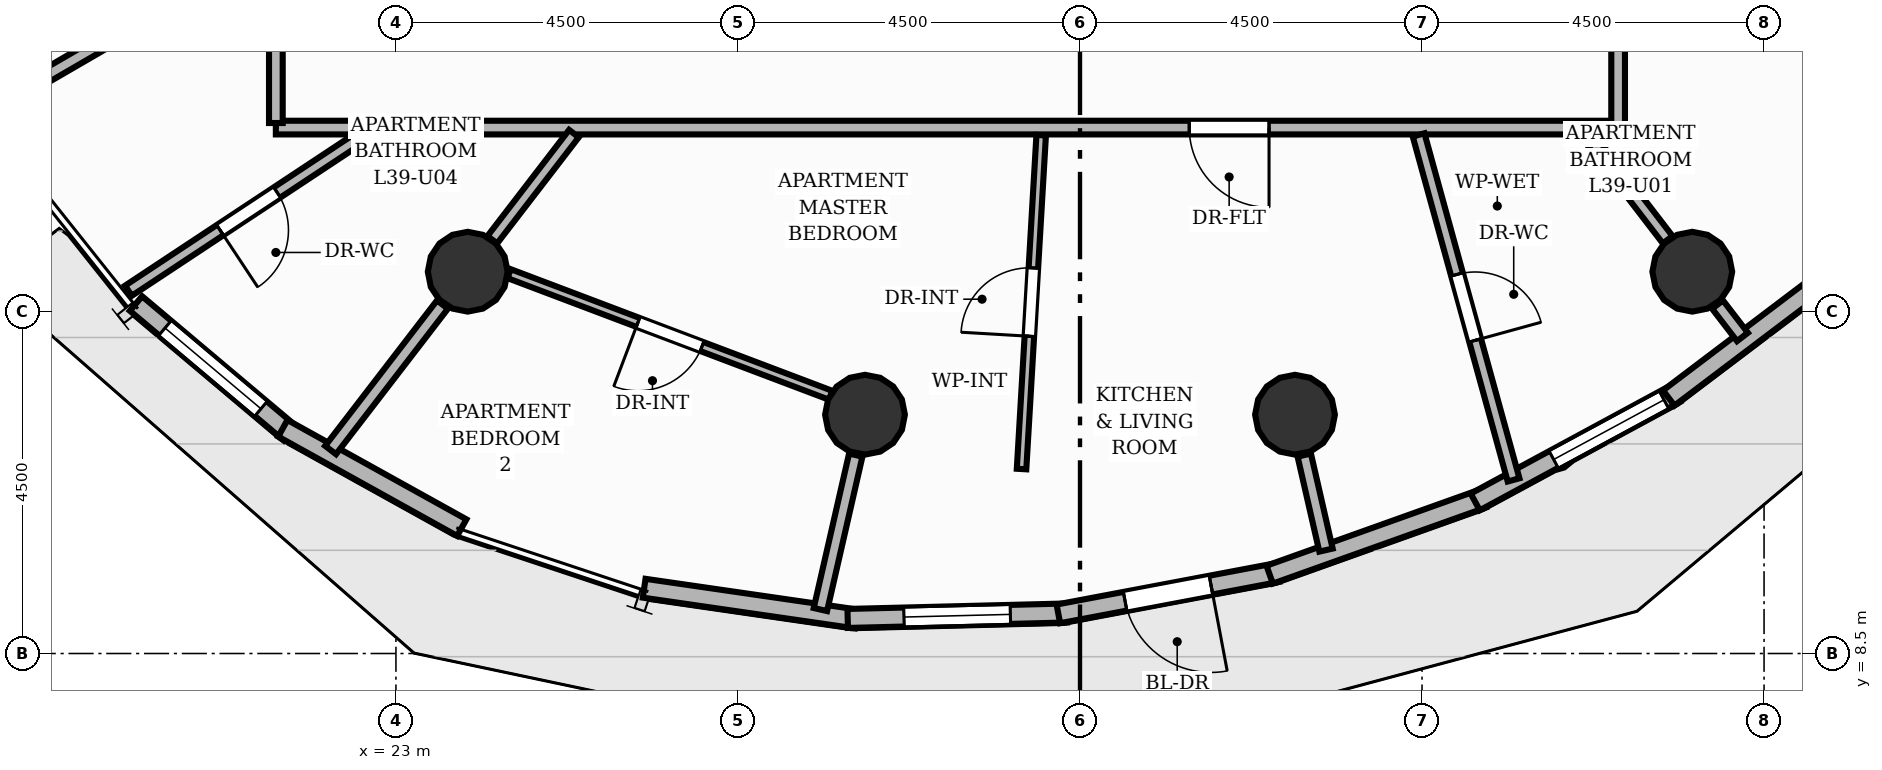
"""IFC4 building model, lengths in metres.
Left out: names, types, materials, properties, quantities, classifications, styles, units other than length and angle.
Written with IfcOpenShell. Run it as: python <this file> out.ifc"""

import sys

from ifc_helpers import new_model, si_unit, direction, frame, frame_2d, origin, origin_2d, place, context, subcontext, project, spatial, rectangle, circle, extrude, element, fill, save


model = new_model("IFC4")
c1 = context("Model", 3, precision=1e-05, world=origin(), true_north=direction((0.0, 1.0)))
c2 = subcontext(c1, "Body", "Model", "MODEL_VIEW")
j1 = project(units=[si_unit("LENGTHUNIT", "METRE"), si_unit("PLANEANGLEUNIT", "RADIAN")], contexts=[c1])
p1 = place(None, origin())
s1 = spatial("IfcSite", under=j1, at=p1, CompositionType="ELEMENT")
p2 = place(p1, origin())
s2 = spatial("IfcBuilding", under=s1, at=p2, CompositionType="ELEMENT")
p3 = place(p2, frame((0.0, 0.0, 132.96)))
s3 = spatial("IfcBuildingStorey", under=s2, at=p3, CompositionType="ELEMENT", Elevation=132.96)
for number, where, z_axis, x_axis in (
    (1, (23.944, 13.523, 0.0), (0.0, 0.0, 1.0), (1.0, 0.0, 0.0)),
    (2, (29.171, 11.642, 0.0), (0.0, 0.0, 1.0), (1.0, 0.0, 0.0)),
    (3, (34.829, 11.642, 0.0), (0.0, 0.0, 1.0), (1.0, 0.0, 0.0)),
    (4, (40.056, 13.523, 0.0), (0.0, 0.0, 1.0), (1.0, 0.0, 0.0)),
):
    element("IfcColumn", number, at=place(p3, frame(where, z_axis=z_axis, x_axis=x_axis)), inside=s3, PredefinedType="COLUMN", context=c2, shape_type="SweptSolid", body=[
        extrude(circle(Radius=0.525, at=origin_2d()), origin(), (0.0, 0.0, 1.0), 3.2),
    ])
p4 = place(p3, frame((21.605, 11.399, 0.0), z_axis=(0.0, 0.0, 1.0), x_axis=(-0.764825125467, 0.644237943197, 0.0)))
e5 = element("IfcWall", 5, at=p4, inside=s3, PredefinedType="SOLIDWALL", context=c2, shape_type="SweptSolid", body=[
    extrude(rectangle(XDim=2.648, YDim=0.25, at=frame_2d((1.324, 0.0))), origin(), (0.0, 0.0, 1.0), 2.96),
])
p5 = place(p4, frame((0.499, 0.0, 0.85)))
e6 = element("IfcOpeningElement", 6, at=p5, cuts=e5, PredefinedType="OPENING", context=c2, shape_type="SweptSolid", body=[
    extrude(rectangle(XDim=1.65, YDim=1.55, at=frame_2d((0.825, 0.775))), frame((0.0, 0.135, 0.0), z_axis=(0.0, -1.0, 0.0), x_axis=(1.0, 0.0, 0.0)), (0.0, 0.0, 1.0), 0.27),
])
p6 = place(p3, frame((23.866, 10.156, 0.0), z_axis=(0.0, 0.0, 1.0), x_axis=(-0.874341102682, 0.485311895755, 0.0)))
e7 = element("IfcWall", 7, at=p6, inside=s3, PredefinedType="SOLIDWALL", context=c2, shape_type="SweptSolid", body=[
    extrude(rectangle(XDim=2.693, YDim=0.25, at=frame_2d((1.346, 0.0))), origin(), (0.0, 0.0, 1.0), 2.96),
])
p7 = place(p3, frame((29.054, 8.955, 0.0), z_axis=(0.0, 0.0, 1.0), x_axis=(-0.98966505468, 0.143398324768, 0.0)))
e8 = element("IfcWall", 8, at=p7, inside=s3, PredefinedType="SOLIDWALL", context=c2, shape_type="SweptSolid", body=[
    extrude(rectangle(XDim=2.818, YDim=0.25, at=frame_2d((1.409, 0.0))), origin(), (0.0, 0.0, 1.0), 2.96),
])
p8 = place(p3, frame((31.824, 9.033, 0.0), z_axis=(0.0, 0.0, 1.0), x_axis=(-0.999687646408, -0.02499219116, 0.0)))
e9 = element("IfcWall", 9, at=p8, inside=s3, PredefinedType="SOLIDWALL", context=c2, shape_type="SweptSolid", body=[
    extrude(rectangle(XDim=2.882, YDim=0.25, at=frame_2d((1.441, 0.0))), origin(), (0.0, 0.0, 1.0), 2.96),
])
p9 = place(p8, frame((0.741, 0.0, 0.85)))
e10 = element("IfcOpeningElement", 10, at=p9, cuts=e9, PredefinedType="OPENING", context=c2, shape_type="SweptSolid", body=[
    extrude(rectangle(XDim=1.4, YDim=1.55, at=frame_2d((0.7, 0.775))), frame((0.0, 0.135, 0.0), z_axis=(0.0, -1.0, 0.0), x_axis=(1.0, 0.0, 0.0)), (0.0, 0.0, 1.0), 0.27),
])
p10 = place(p3, frame((34.601, 9.566, 0.0), z_axis=(0.0, 0.0, 1.0), x_axis=(-0.982637070109, -0.185538105108, 0.0)))
e11 = element("IfcWall", 11, at=p10, inside=s3, PredefinedType="SOLIDWALL", context=c2, shape_type="SweptSolid", body=[
    extrude(rectangle(XDim=2.937, YDim=0.25, at=frame_2d((1.469, 0.0))), origin(), (0.0, 0.0, 1.0), 2.96),
])
p11 = place(p10, frame((0.893, 0.0, 0.0)))
e12 = element("IfcOpeningElement", 12, at=p11, cuts=e11, PredefinedType="OPENING", context=c2, shape_type="SweptSolid", body=[
    extrude(rectangle(XDim=1.15, YDim=2.2, at=frame_2d((0.575, 1.1))), frame((0.0, 0.135, 0.0), z_axis=(0.0, -1.0, 0.0), x_axis=(1.0, 0.0, 0.0)), (0.0, 0.0, 1.0), 0.27),
])
p12 = place(p3, frame((37.299, 10.539, 0.0), z_axis=(0.0, 0.0, 1.0), x_axis=(-0.94175304307, -0.33630522724, 0.0)))
e13 = element("IfcWall", 13, at=p12, inside=s3, PredefinedType="SOLIDWALL", context=c2, shape_type="SweptSolid", body=[
    extrude(rectangle(XDim=2.977, YDim=0.25, at=frame_2d((1.489, 0.0))), origin(), (0.0, 0.0, 1.0), 2.96),
])
p13 = place(p3, frame((39.837, 11.921, 0.0), z_axis=(0.0, 0.0, 1.0), x_axis=(-0.879567466611, -0.475774181393, 0.0)))
e14 = element("IfcWall", 14, at=p13, inside=s3, PredefinedType="SOLIDWALL", context=c2, shape_type="SweptSolid", body=[
    extrude(rectangle(XDim=2.998, YDim=0.25, at=frame_2d((1.499, 0.0))), origin(), (0.0, 0.0, 1.0), 2.96),
])
p14 = place(p13, frame((0.175, 0.0, 0.85)))
e15 = element("IfcOpeningElement", 15, at=p14, cuts=e14, PredefinedType="OPENING", context=c2, shape_type="SweptSolid", body=[
    extrude(rectangle(XDim=1.65, YDim=1.55, at=frame_2d((0.825, 0.775))), frame((0.0, 0.135, 0.0), z_axis=(0.0, -1.0, 0.0), x_axis=(1.0, 0.0, 0.0)), (0.0, 0.0, 1.0), 0.27),
])
p15 = place(p3, frame((42.137, 13.671, 0.0), z_axis=(0.0, 0.0, 1.0), x_axis=(-0.797511213298, -0.603304122863, 0.0)))
e16 = element("IfcWall", 16, at=p15, inside=s3, PredefinedType="SOLIDWALL", context=c2, shape_type="SweptSolid", body=[
    extrude(rectangle(XDim=2.998, YDim=0.25, at=frame_2d((1.499, 0.0))), origin(), (0.0, 0.0, 1.0), 2.96),
])
p16 = place(p3, frame((19.472, 16.726, 0.0), z_axis=(0.0, 0.0, 1.0), x_axis=(-0.864844369658, -0.502040054448, 0.0)))
e17 = element("IfcWall", 17, at=p16, inside=s3, PredefinedType="PARTITIONING", context=c2, shape_type="SweptSolid", body=[
    extrude(rectangle(XDim=1.974, YDim=0.18, at=frame_2d((0.987, 0.0))), origin(), (0.0, 0.0, 1.0), 2.336),
])
p17 = place(p3, frame((23.612, 13.092, 0.0), z_axis=(0.0, 0.0, 1.0), x_axis=(-0.609549509747, -0.79274800231, 0.0)))
e18 = element("IfcWall", 18, at=p17, inside=s3, PredefinedType="PARTITIONING", context=c2, shape_type="SweptSolid", body=[
    extrude(rectangle(XDim=2.415, YDim=0.18, at=frame_2d((1.208, 0.0))), origin(), (0.0, 0.0, 1.0), 2.336),
])
p18 = place(p3, frame((29.05, 11.111, 0.0), z_axis=(0.0, 0.0, 1.0), x_axis=(-0.223063251486, -0.974803973031, 0.0)))
e19 = element("IfcWall", 19, at=p18, inside=s3, PredefinedType="PARTITIONING", context=c2, shape_type="SweptSolid", body=[
    extrude(rectangle(XDim=2.085, YDim=0.18, at=frame_2d((1.042, 0.0))), origin(), (0.0, 0.0, 1.0), 2.336),
])
p19 = place(p3, frame((34.95, 11.111, 0.0), z_axis=(0.0, 0.0, 1.0), x_axis=(0.223093561241, -0.974797036789, 0.0)))
e20 = element("IfcWall", 20, at=p19, inside=s3, PredefinedType="PARTITIONING", context=c2, shape_type="SweptSolid", body=[
    extrude(rectangle(XDim=1.282, YDim=0.18, at=frame_2d((0.641, 0.0))), origin(), (0.0, 0.0, 1.0), 2.336),
])
p20 = place(p3, frame((40.388, 13.092, 0.0), z_axis=(0.0, 0.0, 1.0), x_axis=(0.609469486836, -0.792809526063, 0.0)))
e21 = element("IfcWall", 21, at=p20, inside=s3, PredefinedType="PARTITIONING", context=c2, shape_type="SweptSolid", body=[
    extrude(rectangle(XDim=0.538, YDim=0.18, at=frame_2d((0.269, 0.0))), origin(), (0.0, 0.0, 1.0), 2.336),
])
p21 = place(p3, frame((39.08, 15.42, 0.0), z_axis=(0.0, 0.0, 1.0), x_axis=(-1.0, 0.0, 0.0)))
e22 = element("IfcWall", 22, at=p21, inside=s3, PredefinedType="PARTITIONING", context=c2, shape_type="SweptSolid", body=[
    extrude(rectangle(XDim=16.39, YDim=0.18, at=frame_2d((8.195, 0.0))), origin(), (0.0, 0.0, 1.0), 2.955),
])
p22 = place(p21, frame((4.593, 0.0, 0.0)))
e23 = element("IfcOpeningElement", 23, at=p22, cuts=e22, PredefinedType="OPENING", context=c2, shape_type="SweptSolid", body=[
    extrude(rectangle(XDim=1.05, YDim=2.15, at=frame_2d((0.525, 1.075))), frame((0.0, 0.1, 0.0), z_axis=(0.0, -1.0, 0.0), x_axis=(1.0, 0.0, 0.0)), (0.0, 0.0, 1.0), 0.2),
])
p23 = place(p3, frame((39.08, 32.58, 0.0), z_axis=(0.0, 0.0, 1.0), x_axis=(0.0, -1.0, 0.0)))
e24 = element("IfcWall", 24, at=p23, inside=s3, PredefinedType="PARTITIONING", context=c2, shape_type="SweptSolid", body=[
    extrude(rectangle(XDim=17.16, YDim=0.18, at=frame_2d((8.58, 0.0))), origin(), (0.0, 0.0, 1.0), 2.955),
])
p24 = place(p23, frame((9.64, 0.0, 0.0)))
e25 = element("IfcOpeningElement", 25, at=p24, cuts=e24, PredefinedType="OPENING", context=c2, shape_type="SweptSolid", body=[
    extrude(rectangle(XDim=1.05, YDim=2.15, at=frame_2d((0.525, 1.075))), frame((0.0, 0.1, 0.0), z_axis=(0.0, -1.0, 0.0), x_axis=(1.0, 0.0, 0.0)), (0.0, 0.0, 1.0), 0.2),
])
p25 = place(p3, frame((22.746, 15.42, 0.0), z_axis=(0.0, 0.0, 1.0), x_axis=(-1.0, 0.0, 0.0)))
e26 = element("IfcWall", 26, at=p25, inside=s3, PredefinedType="PARTITIONING", context=c2, shape_type="SweptSolid", body=[
    extrude(rectangle(XDim=1.326, YDim=0.18, at=frame_2d((0.663, 0.0))), origin(), (0.0, 0.0, 1.0), 2.955),
])
p26 = place(p3, frame((21.42, 15.48, 0.0), z_axis=(0.0, 0.0, 1.0), x_axis=(0.0, 1.0, 0.0)))
e27 = element("IfcWall", 27, at=p26, inside=s3, PredefinedType="PARTITIONING", context=c2, shape_type="SweptSolid", body=[
    extrude(rectangle(XDim=6.12, YDim=0.18, at=frame_2d((3.06, 0.0))), origin(), (0.0, 0.0, 1.0), 2.955),
])
p27 = place(p26, frame((2.167, 0.0, 0.0)))
e28 = element("IfcOpeningElement", 28, at=p27, cuts=e27, PredefinedType="OPENING", context=c2, shape_type="SweptSolid", body=[
    extrude(rectangle(XDim=1.05, YDim=2.15, at=frame_2d((0.525, 1.075))), frame((0.0, 0.1, 0.0), z_axis=(0.0, -1.0, 0.0), x_axis=(1.0, 0.0, 0.0)), (0.0, 0.0, 1.0), 0.2),
])
p28 = place(p3, frame((36.455, 15.323, 0.0), z_axis=(0.0, 0.0, 1.0), x_axis=(0.265393905211, -0.964140070258, 0.0)))
e29 = element("IfcWall", 29, at=p28, inside=s3, PredefinedType="PLUMBINGWALL", context=c2, shape_type="SweptSolid", body=[
    extrude(rectangle(XDim=4.708, YDim=0.16, at=frame_2d((2.354, 0.0))), origin(), (0.0, 0.0, 1.0), 2.955),
])
p29 = place(p28, frame((1.904, 0.0, 0.0)))
e30 = element("IfcOpeningElement", 30, at=p29, cuts=e29, PredefinedType="OPENING", context=c2, shape_type="SweptSolid", body=[
    extrude(rectangle(XDim=0.9, YDim=2.1, at=frame_2d((0.45, 1.05))), frame((0.0, 0.09, 0.0), z_axis=(0.0, -1.0, 0.0), x_axis=(1.0, 0.0, 0.0)), (0.0, 0.0, 1.0), 0.18),
])
p30 = place(p3, frame((31.231, 10.927, 0.0), z_axis=(0.0, 0.0, 1.0), x_axis=(0.058751291398, 0.998272651012, 0.0)))
e31 = element("IfcWall", 31, at=p30, inside=s3, PredefinedType="PARTITIONING", context=c2, shape_type="SweptSolid", body=[
    extrude(rectangle(XDim=4.401, YDim=0.125, at=frame_2d((2.2, 0.0))), origin(), (0.0, 0.0, 1.0), 2.692),
])
p31 = place(p30, frame((1.75, 0.0, 0.0)))
e32 = element("IfcOpeningElement", 32, at=p31, cuts=e31, PredefinedType="OPENING", context=c2, shape_type="SweptSolid", body=[
    extrude(rectangle(XDim=0.9, YDim=2.1, at=frame_2d((0.45, 1.05))), frame((0.0, 0.073, 0.0), z_axis=(0.0, -1.0, 0.0), x_axis=(1.0, 0.0, 0.0)), (0.0, 0.0, 1.0), 0.145),
])
p32 = place(p3, frame((38.658, 15.341, 0.0), z_axis=(0.0, 0.0, 1.0), x_axis=(0.609536601946, -0.792757927042, 0.0)))
e33 = element("IfcWall", 33, at=p32, inside=s3, PredefinedType="PLUMBINGWALL", context=c2, shape_type="SweptSolid", body=[
    extrude(rectangle(XDim=1.761, YDim=0.16, at=frame_2d((0.881, 0.0))), origin(), (0.0, 0.0, 1.0), 2.336),
])
p33 = place(p3, frame((28.722, 11.897, 0.0), z_axis=(0.0, 0.0, 1.0), x_axis=(-0.935309901838, 0.353829602385, 0.0)))
e34 = element("IfcWall", 34, at=p33, inside=s3, PredefinedType="PARTITIONING", context=c2, shape_type="SweptSolid", body=[
    extrude(rectangle(XDim=4.526, YDim=0.125, at=frame_2d((2.263, 0.0))), origin(), (0.0, 0.0, 1.0), 2.411),
])
p34 = place(p33, frame((1.813, 0.0, 0.0)))
e35 = element("IfcOpeningElement", 35, at=p34, cuts=e34, PredefinedType="OPENING", context=c2, shape_type="SweptSolid", body=[
    extrude(rectangle(XDim=0.9, YDim=2.1, at=frame_2d((0.45, 1.05))), frame((0.0, 0.073, 0.0), z_axis=(0.0, -1.0, 0.0), x_axis=(1.0, 0.0, 0.0)), (0.0, 0.0, 1.0), 0.145),
])
p35 = place(p3, frame((24.268, 13.944, 0.0), z_axis=(0.0, 0.0, 1.0), x_axis=(0.609536601946, 0.792757927042, 0.0)))
e36 = element("IfcWall", 36, at=p35, inside=s3, PredefinedType="PLUMBINGWALL", context=c2, shape_type="SweptSolid", body=[
    extrude(rectangle(XDim=1.761, YDim=0.16, at=frame_2d((0.881, 0.0))), origin(), (0.0, 0.0, 1.0), 2.336),
])
p36 = place(p3, frame((22.643, 15.365, 0.0), z_axis=(0.0, 0.0, 1.0), x_axis=(-0.83413433024, -0.551561346647, 0.0)))
e37 = element("IfcWall", 37, at=p36, inside=s3, PredefinedType="PLUMBINGWALL", context=c2, shape_type="SweptSolid", body=[
    extrude(rectangle(XDim=3.792, YDim=0.16, at=frame_2d((1.896, 0.0))), origin(), (0.0, 0.0, 1.0), 2.955),
])
p37 = place(p36, frame((1.446, 0.0, 0.0)))
e38 = element("IfcOpeningElement", 38, at=p37, cuts=e37, PredefinedType="OPENING", context=c2, shape_type="SweptSolid", body=[
    extrude(rectangle(XDim=0.9, YDim=2.1, at=frame_2d((0.45, 1.05))), frame((0.0, 0.09, 0.0), z_axis=(0.0, -1.0, 0.0), x_axis=(1.0, 0.0, 0.0)), (0.0, 0.0, 1.0), 0.18),
])
p38 = place(p11, origin())
e39 = element("IfcDoor", 39, at=p38, inside=s3, OperationType="SINGLE_SWING_LEFT", PredefinedType="DOOR", context=c2, shape_type="SweptSolid", body=[
    extrude(rectangle(XDim=1.15, YDim=2.2, at=frame_2d((0.575, 1.1))), frame((0.0, 0.025, 0.0), z_axis=(0.0, -1.0, 0.0), x_axis=(1.0, 0.0, 0.0)), (0.0, 0.0, 1.0), 0.05),
])
fill(e12, e39)
p39 = place(p5, origin())
e40 = element("IfcWindow", 40, at=p39, inside=s3, PartitioningType="SINGLE_PANEL", PredefinedType="WINDOW", context=c2, shape_type="SweptSolid", body=[
    extrude(rectangle(XDim=1.65, YDim=1.55, at=frame_2d((0.825, 0.775))), frame((0.0, 0.03, 0.0), z_axis=(0.0, -1.0, 0.0), x_axis=(1.0, 0.0, 0.0)), (0.0, 0.0, 1.0), 0.06),
])
fill(e6, e40)
p40 = place(p9, origin())
e41 = element("IfcWindow", 41, at=p40, inside=s3, PartitioningType="SINGLE_PANEL", PredefinedType="WINDOW", context=c2, shape_type="SweptSolid", body=[
    extrude(rectangle(XDim=1.4, YDim=1.55, at=frame_2d((0.7, 0.775))), frame((0.0, 0.03, 0.0), z_axis=(0.0, -1.0, 0.0), x_axis=(1.0, 0.0, 0.0)), (0.0, 0.0, 1.0), 0.06),
])
fill(e10, e41)
p41 = place(p14, origin())
e42 = element("IfcWindow", 42, at=p41, inside=s3, PartitioningType="SINGLE_PANEL", PredefinedType="WINDOW", context=c2, shape_type="SweptSolid", body=[
    extrude(rectangle(XDim=1.65, YDim=1.55, at=frame_2d((0.825, 0.775))), frame((0.0, 0.03, 0.0), z_axis=(0.0, -1.0, 0.0), x_axis=(1.0, 0.0, 0.0)), (0.0, 0.0, 1.0), 0.06),
])
fill(e15, e42)
p42 = place(p22, origin())
e43 = element("IfcDoor", 43, at=p42, inside=s3, OperationType="SINGLE_SWING_LEFT", PredefinedType="DOOR", context=c2, shape_type="SweptSolid", body=[
    extrude(rectangle(XDim=1.05, YDim=2.15, at=frame_2d((0.525, 1.075))), frame((0.0, 0.025, 0.0), z_axis=(0.0, -1.0, 0.0), x_axis=(1.0, 0.0, 0.0)), (0.0, 0.0, 1.0), 0.05),
])
fill(e23, e43)
p43 = place(p29, origin())
e44 = element("IfcDoor", 44, at=p43, inside=s3, OperationType="SINGLE_SWING_RIGHT", PredefinedType="DOOR", context=c2, shape_type="SweptSolid", body=[
    extrude(rectangle(XDim=0.9, YDim=2.1, at=frame_2d((0.45, 1.05))), frame((0.0, 0.025, 0.0), z_axis=(0.0, -1.0, 0.0), x_axis=(1.0, 0.0, 0.0)), (0.0, 0.0, 1.0), 0.05),
])
fill(e30, e44)
p44 = place(p31, origin())
e45 = element("IfcDoor", 45, at=p44, inside=s3, OperationType="SINGLE_SWING_LEFT", PredefinedType="DOOR", context=c2, shape_type="SweptSolid", body=[
    extrude(rectangle(XDim=0.9, YDim=2.1, at=frame_2d((0.45, 1.05))), frame((0.0, 0.025, 0.0), z_axis=(0.0, -1.0, 0.0), x_axis=(1.0, 0.0, 0.0)), (0.0, 0.0, 1.0), 0.05),
])
fill(e32, e45)
p45 = place(p34, origin())
e46 = element("IfcDoor", 46, at=p45, inside=s3, OperationType="SINGLE_SWING_RIGHT", PredefinedType="DOOR", context=c2, shape_type="SweptSolid", body=[
    extrude(rectangle(XDim=0.9, YDim=2.1, at=frame_2d((0.45, 1.05))), frame((0.0, 0.025, 0.0), z_axis=(0.0, -1.0, 0.0), x_axis=(1.0, 0.0, 0.0)), (0.0, 0.0, 1.0), 0.05),
])
fill(e35, e46)
p46 = place(p37, origin())
e47 = element("IfcDoor", 47, at=p46, inside=s3, OperationType="SINGLE_SWING_RIGHT", PredefinedType="DOOR", context=c2, shape_type="SweptSolid", body=[
    extrude(rectangle(XDim=0.9, YDim=2.1, at=frame_2d((0.45, 1.05))), frame((0.0, 0.025, 0.0), z_axis=(0.0, -1.0, 0.0), x_axis=(1.0, 0.0, 0.0)), (0.0, 0.0, 1.0), 0.05),
])
fill(e38, e47)
save(model, sys.argv[1])
